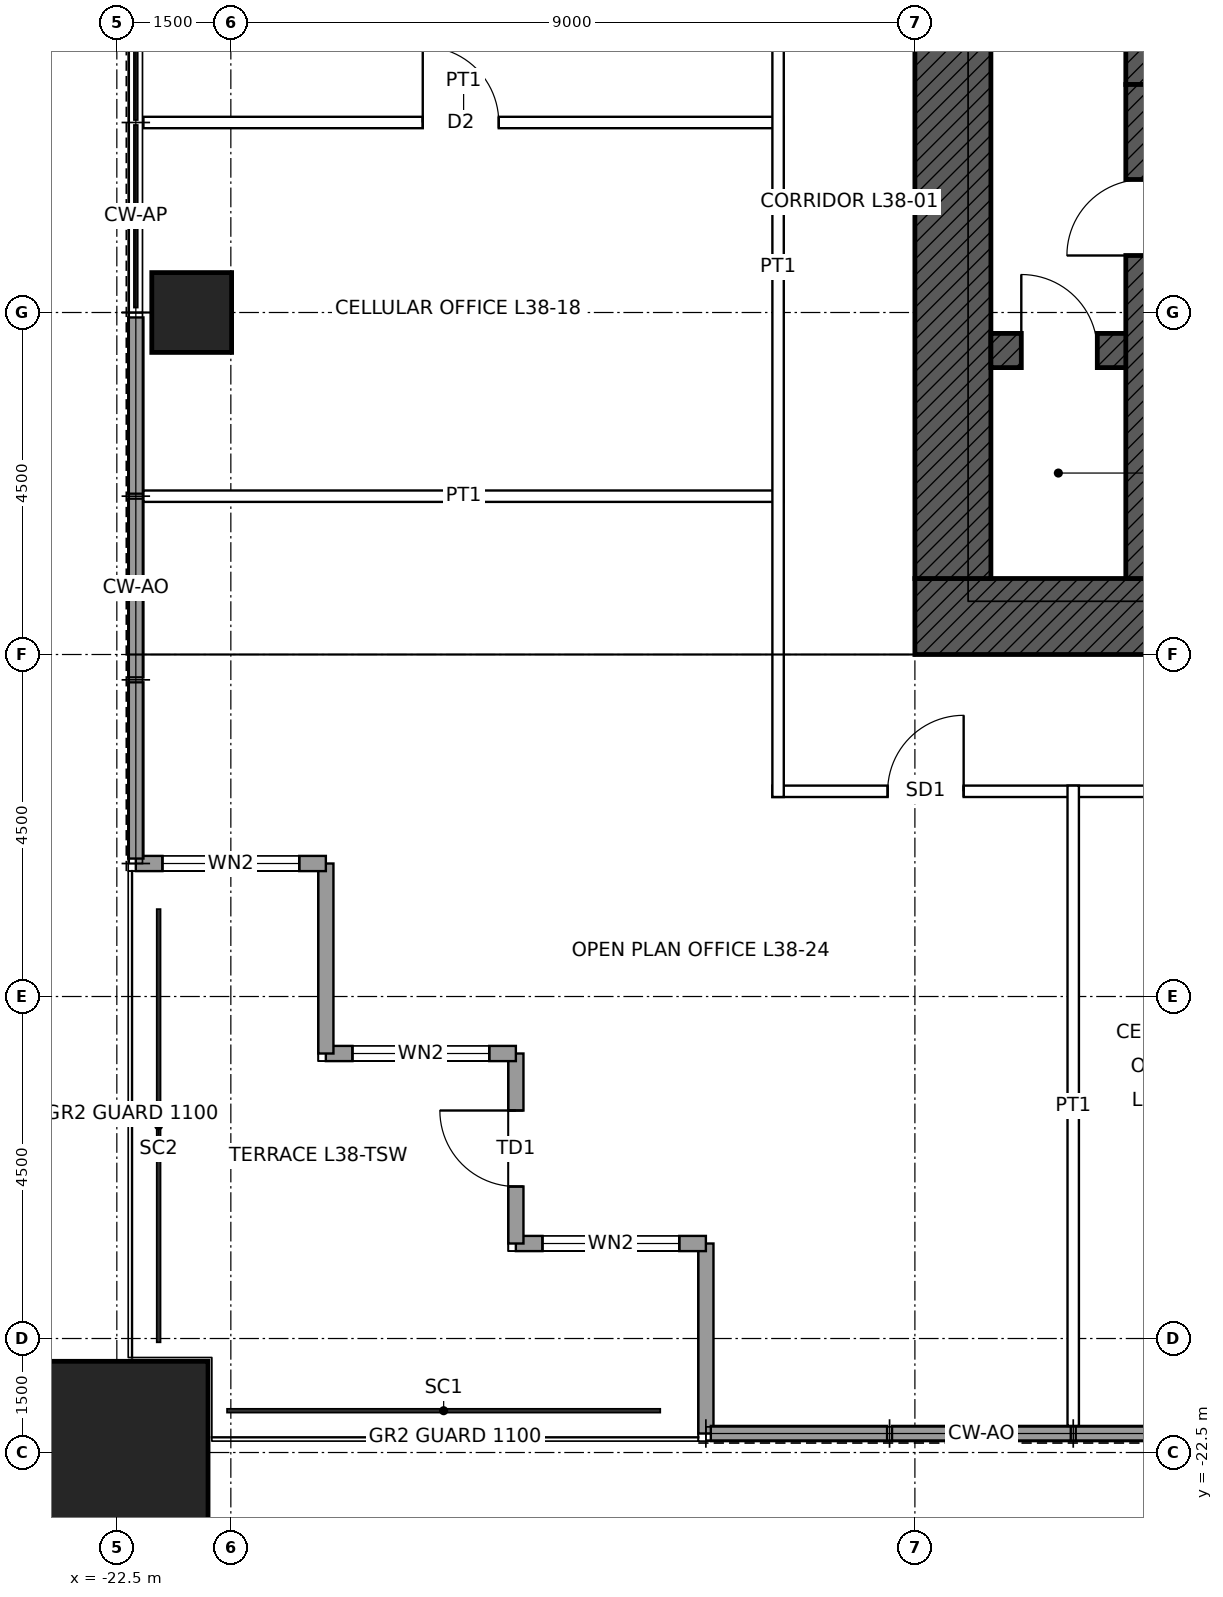
"""IFC4 building model, lengths in metres.
Left out: names, types, materials, properties, quantities, classifications, styles, units other than length and angle.
Written with IfcOpenShell. Run it as: python <this file> out.ifc"""

import sys

from ifc_helpers import new_model, si_unit, direction, frame, frame_2d, origin, origin_2d, place, context, subcontext, project, spatial, rectangle, hollow_rectangle, extrude, element, fill, save


model = new_model("IFC4")
c1 = context("Model", 3, precision=1e-05, world=origin(), true_north=direction((0.0, 1.0)))
c2 = subcontext(c1, "Body", "Model", "MODEL_VIEW")
j1 = project(units=[si_unit("LENGTHUNIT", "METRE"), si_unit("PLANEANGLEUNIT", "RADIAN")], contexts=[c1])
p1 = place(None, origin())
s1 = spatial("IfcSite", under=j1, at=p1, CompositionType="ELEMENT")
p2 = place(p1, origin())
s2 = spatial("IfcBuilding", under=s1, at=p2, CompositionType="ELEMENT")
p3 = place(p2, frame((0.0, 0.0, 185.9)))
s3 = spatial("IfcBuildingStorey", under=s2, at=p3, CompositionType="ELEMENT", Elevation=185.9)
p4 = place(p3, frame((-22.5, -22.5, 0.0), z_axis=(0.0, 0.0, 1.0), x_axis=(1.0, 0.0, 0.0)))
e1 = element("IfcColumn", 1, at=p4, inside=s3, PredefinedType="COLUMN", context=c2, shape_type="SweptSolid", body=[
    extrude(hollow_rectangle(XDim=2.4, YDim=2.4, WallThickness=0.12, at=origin_2d()), origin(), (0.0, 0.0, 1.0), 4.0),
])
p5 = place(p3, frame((-21.515, -7.5, 0.0), z_axis=(0.0, 0.0, 1.0), x_axis=(1.0, 0.0, 0.0)))
e2 = element("IfcColumn", 2, at=p5, inside=s3, PredefinedType="COLUMN", context=c2, shape_type="SweptSolid", body=[
    extrude(hollow_rectangle(XDim=1.05, YDim=1.05, WallThickness=0.07, at=origin_2d()), origin(), (0.0, 0.0, 1.0), 4.0),
])
p6 = place(p3, frame((12.0, -11.5, 0.0), z_axis=(0.0, 0.0, 1.0), x_axis=(-1.0, 0.0, 0.0)))
e3 = element("IfcWall", 3, at=p6, inside=s3, PredefinedType="SHEAR", context=c2, shape_type="SweptSolid", body=[
    extrude(rectangle(XDim=24.0, YDim=1.0, at=frame_2d((12.0, 0.0))), origin(), (0.0, 0.0, 1.0), 4.0),
])
p7 = place(p6, frame((11.5, 0.0, 0.0)))
e4 = element("IfcOpeningElement", 4, at=p7, cuts=e3, PredefinedType="OPENING", context=c2, shape_type="SweptSolid", body=[
    extrude(rectangle(XDim=1.0, YDim=2.1, at=frame_2d((0.5, 1.05))), frame((0.0, 0.51, 0.0), z_axis=(0.0, -1.0, 0.0), x_axis=(1.0, 0.0, 0.0)), (0.0, 0.0, 1.0), 1.02),
])
p8 = place(p6, frame((1.0, 0.0, 0.0)))
e5 = element("IfcOpeningElement", 5, at=p8, cuts=e3, PredefinedType="OPENING", context=c2, shape_type="SweptSolid", body=[
    extrude(rectangle(XDim=1.0, YDim=2.4, at=frame_2d((0.5, 1.2))), frame((0.0, 0.51, 0.0), z_axis=(0.0, -1.0, 0.0), x_axis=(1.0, 0.0, 0.0)), (0.0, 0.0, 1.0), 1.02),
])
p9 = place(p3, frame((-11.5, -11.0, 0.0), z_axis=(0.0, 0.0, 1.0), x_axis=(0.0, 1.0, 0.0)))
e6 = element("IfcWall", 6, at=p9, inside=s3, PredefinedType="SHEAR", context=c2, shape_type="SweptSolid", body=[
    extrude(rectangle(XDim=22.0, YDim=1.0, at=frame_2d((11.0, 0.0))), origin(), (0.0, 0.0, 1.0), 4.0),
])
p10 = place(p9, frame((10.5, 0.0, 0.0)))
e7 = element("IfcOpeningElement", 7, at=p10, cuts=e6, PredefinedType="OPENING", context=c2, shape_type="SweptSolid", body=[
    extrude(rectangle(XDim=1.0, YDim=2.4, at=frame_2d((0.5, 1.2))), frame((0.0, 0.51, 0.0), z_axis=(0.0, -1.0, 0.0), x_axis=(1.0, 0.0, 0.0)), (0.0, 0.0, 1.0), 1.02),
])
p11 = place(p3, frame((-9.0, -4.5, 0.0), z_axis=(0.0, 0.0, 1.0), x_axis=(1.0, 0.0, 0.0)))
e8 = element("IfcWall", 8, at=p11, inside=s3, PredefinedType="SHEAR", context=c2, shape_type="SweptSolid", body=[
    extrude(rectangle(XDim=18.0, YDim=0.45, at=frame_2d((9.0, 0.0))), origin(), (0.0, 0.0, 1.0), 4.0),
])
p12 = place(p3, frame((-11.0, -8.0, 0.0), z_axis=(0.0, 0.0, 1.0), x_axis=(1.0, 0.0, 0.0)))
e9 = element("IfcWall", 9, at=p12, inside=s3, PredefinedType="SHEAR", context=c2, shape_type="SweptSolid", body=[
    extrude(rectangle(XDim=2.0, YDim=0.45, at=frame_2d((1.0, 0.0))), origin(), (0.0, 0.0, 1.0), 4.0),
])
p13 = place(p12, frame((0.4, 0.0, 0.0)))
e10 = element("IfcOpeningElement", 10, at=p13, cuts=e9, PredefinedType="OPENING", context=c2, shape_type="SweptSolid", body=[
    extrude(rectangle(XDim=1.0, YDim=2.1, at=frame_2d((0.5, 1.05))), frame((0.0, 0.235, 0.0), z_axis=(0.0, -1.0, 0.0), x_axis=(1.0, 0.0, 0.0)), (0.0, 0.0, 1.0), 0.47),
])
p14 = place(p3, frame((-9.0, -4.5, 0.0), z_axis=(0.0, 0.0, 1.0), x_axis=(0.0, 1.0, 0.0)))
e11 = element("IfcWall", 11, at=p14, inside=s3, PredefinedType="SHEAR", context=c2, shape_type="SweptSolid", body=[
    extrude(rectangle(XDim=3.0, YDim=0.45, at=frame_2d((1.5, 0.0))), origin(), (0.0, 0.0, 1.0), 4.0),
])
p15 = place(p3, frame((-9.0, -11.0, 0.0), z_axis=(0.0, 0.0, 1.0), x_axis=(0.0, 1.0, 0.0)))
e12 = element("IfcWall", 12, at=p15, inside=s3, PredefinedType="SHEAR", context=c2, shape_type="SweptSolid", body=[
    extrude(rectangle(XDim=6.5, YDim=0.45, at=frame_2d((3.25, 0.0))), origin(), (0.0, 0.0, 1.0), 4.0),
])
p16 = place(p15, frame((4.25, 0.0, 0.0)))
e13 = element("IfcOpeningElement", 13, at=p16, cuts=e12, PredefinedType="OPENING", context=c2, shape_type="SweptSolid", body=[
    extrude(rectangle(XDim=1.0, YDim=2.1, at=frame_2d((0.5, 1.05))), frame((0.0, 0.235, 0.0), z_axis=(0.0, -1.0, 0.0), x_axis=(1.0, 0.0, 0.0)), (0.0, 0.0, 1.0), 0.47),
])
p17 = place(p3, frame((-14.75, -22.25, 0.0), z_axis=(0.0, 0.0, 1.0), x_axis=(0.0, 1.0, 0.0)))
e14 = element("IfcWall", 14, at=p17, inside=s3, PredefinedType="SOLIDWALL", context=c2, shape_type="SweptSolid", body=[
    extrude(rectangle(XDim=2.5, YDim=0.2, at=frame_2d((1.25, 0.0))), origin(), (0.0, 0.0, 1.0), 3.85),
])
p18 = place(p3, frame((-14.75, -19.75, 0.0), z_axis=(0.0, 0.0, 1.0), x_axis=(-1.0, 0.0, 0.0)))
e15 = element("IfcWall", 15, at=p18, inside=s3, PredefinedType="SOLIDWALL", context=c2, shape_type="SweptSolid", body=[
    extrude(rectangle(XDim=2.5, YDim=0.2, at=frame_2d((1.25, 0.0))), origin(), (0.0, 0.0, 1.0), 3.85),
])
p19 = place(p18, frame((0.35, 0.0, 0.3)))
e16 = element("IfcOpeningElement", 16, at=p19, cuts=e15, PredefinedType="OPENING", context=c2, shape_type="SweptSolid", body=[
    extrude(rectangle(XDim=1.8, YDim=2.4, at=frame_2d((0.9, 1.2))), frame((0.0, 0.11, 0.0), z_axis=(0.0, -1.0, 0.0), x_axis=(1.0, 0.0, 0.0)), (0.0, 0.0, 1.0), 0.22),
])
p20 = place(p3, frame((-17.25, -19.75, 0.0), z_axis=(0.0, 0.0, 1.0), x_axis=(0.0, 1.0, 0.0)))
e17 = element("IfcWall", 17, at=p20, inside=s3, PredefinedType="SOLIDWALL", context=c2, shape_type="SweptSolid", body=[
    extrude(rectangle(XDim=2.5, YDim=0.2, at=frame_2d((1.25, 0.0))), origin(), (0.0, 0.0, 1.0), 3.85),
])
p21 = place(p20, frame((0.75, 0.0, 0.0)))
e18 = element("IfcOpeningElement", 18, at=p21, cuts=e17, PredefinedType="OPENING", context=c2, shape_type="SweptSolid", body=[
    extrude(rectangle(XDim=1.0, YDim=2.4, at=frame_2d((0.5, 1.2))), frame((0.0, 0.11, 0.0), z_axis=(0.0, -1.0, 0.0), x_axis=(1.0, 0.0, 0.0)), (0.0, 0.0, 1.0), 0.22),
])
p22 = place(p3, frame((-17.25, -17.25, 0.0), z_axis=(0.0, 0.0, 1.0), x_axis=(-1.0, 0.0, 0.0)))
e19 = element("IfcWall", 19, at=p22, inside=s3, PredefinedType="SOLIDWALL", context=c2, shape_type="SweptSolid", body=[
    extrude(rectangle(XDim=2.5, YDim=0.2, at=frame_2d((1.25, 0.0))), origin(), (0.0, 0.0, 1.0), 3.85),
])
p23 = place(p22, frame((0.35, 0.0, 0.3)))
e20 = element("IfcOpeningElement", 20, at=p23, cuts=e19, PredefinedType="OPENING", context=c2, shape_type="SweptSolid", body=[
    extrude(rectangle(XDim=1.8, YDim=2.4, at=frame_2d((0.9, 1.2))), frame((0.0, 0.11, 0.0), z_axis=(0.0, -1.0, 0.0), x_axis=(1.0, 0.0, 0.0)), (0.0, 0.0, 1.0), 0.22),
])
p24 = place(p3, frame((-19.75, -17.25, 0.0), z_axis=(0.0, 0.0, 1.0), x_axis=(0.0, 1.0, 0.0)))
e21 = element("IfcWall", 21, at=p24, inside=s3, PredefinedType="SOLIDWALL", context=c2, shape_type="SweptSolid", body=[
    extrude(rectangle(XDim=2.5, YDim=0.2, at=frame_2d((1.25, 0.0))), origin(), (0.0, 0.0, 1.0), 3.85),
])
p25 = place(p3, frame((-19.75, -14.75, 0.0), z_axis=(0.0, 0.0, 1.0), x_axis=(-1.0, 0.0, 0.0)))
e22 = element("IfcWall", 22, at=p25, inside=s3, PredefinedType="SOLIDWALL", context=c2, shape_type="SweptSolid", body=[
    extrude(rectangle(XDim=2.5, YDim=0.2, at=frame_2d((1.25, 0.0))), origin(), (0.0, 0.0, 1.0), 3.85),
])
p26 = place(p25, frame((0.35, 0.0, 0.3)))
e23 = element("IfcOpeningElement", 23, at=p26, cuts=e22, PredefinedType="OPENING", context=c2, shape_type="SweptSolid", body=[
    extrude(rectangle(XDim=1.8, YDim=2.4, at=frame_2d((0.9, 1.2))), frame((0.0, 0.11, 0.0), z_axis=(0.0, -1.0, 0.0), x_axis=(1.0, 0.0, 0.0)), (0.0, 0.0, 1.0), 0.22),
])
p27 = place(p3, frame((-7.565, -22.25, 0.0), z_axis=(0.0, 0.0, 1.0), x_axis=(-1.0, 0.0, 0.0)))
e24 = element("IfcWall", 24, at=p27, inside=s3, PredefinedType="SOLIDWALL", context=c2, shape_type="SweptSolid", body=[
    extrude(rectangle(XDim=2.319, YDim=0.2, at=frame_2d((1.16, 0.0))), origin(), (0.0, 0.0, 1.0), 3.85),
])
p28 = place(p3, frame((-9.949, -22.25, 0.0), z_axis=(0.0, 0.0, 1.0), x_axis=(-1.0, 0.0, 0.0)))
e25 = element("IfcWall", 25, at=p28, inside=s3, PredefinedType="SOLIDWALL", context=c2, shape_type="SweptSolid", body=[
    extrude(rectangle(XDim=2.352, YDim=0.2, at=frame_2d((1.176, 0.0))), origin(), (0.0, 0.0, 1.0), 3.85),
])
for number, where, z_axis, x_axis in (
    (26, (-12.366, -22.25, 0.0), (0.0, 0.0, 1.0), (-1.0, 0.0, 0.0)),
    (27, (-22.25, -14.685, 0.0), (0.0, 0.0, 1.0), (0.0, 1.0, 0.0)),
):
    element("IfcWall", number, at=place(p3, frame(where, z_axis=z_axis, x_axis=x_axis)), inside=s3, PredefinedType="SOLIDWALL", context=c2, shape_type="SweptSolid", body=[
        extrude(rectangle(XDim=2.319, YDim=0.2, at=frame_2d((1.16, 0.0))), origin(), (0.0, 0.0, 1.0), 3.85),
    ])
p29 = place(p3, frame((-22.25, -12.301, 0.0), z_axis=(0.0, 0.0, 1.0), x_axis=(0.0, 1.0, 0.0)))
e28 = element("IfcWall", 28, at=p29, inside=s3, PredefinedType="SOLIDWALL", context=c2, shape_type="SweptSolid", body=[
    extrude(rectangle(XDim=2.352, YDim=0.2, at=frame_2d((1.176, 0.0))), origin(), (0.0, 0.0, 1.0), 3.85),
])
p30 = place(p3, frame((-22.25, -9.884, 0.0), z_axis=(0.0, 0.0, 1.0), x_axis=(0.0, 1.0, 0.0)))
e29 = element("IfcWall", 29, at=p30, inside=s3, PredefinedType="SOLIDWALL", context=c2, shape_type="SweptSolid", body=[
    extrude(rectangle(XDim=2.319, YDim=0.2, at=frame_2d((1.16, 0.0))), origin(), (0.0, 0.0, 1.0), 3.85),
])
p31 = place(p3, frame((-13.875, -13.8, 0.0), z_axis=(0.0, 0.0, 1.0), x_axis=(1.0, 0.0, 0.0)))
e30 = element("IfcWall", 30, at=p31, inside=s3, PredefinedType="PARTITIONING", context=c2, shape_type="SweptSolid", body=[
    extrude(rectangle(XDim=27.75, YDim=0.15, at=frame_2d((13.875, 0.0))), origin(), (0.0, 0.0, 1.0), 3.85),
])
p32 = place(p31, frame((18.375, 0.0, 0.0)))
e31 = element("IfcOpeningElement", 31, at=p32, cuts=e30, PredefinedType="OPENING", context=c2, shape_type="SweptSolid", body=[
    extrude(rectangle(XDim=1.0, YDim=2.4, at=frame_2d((0.5, 1.2))), frame((0.0, 0.085, 0.0), z_axis=(0.0, -1.0, 0.0), x_axis=(1.0, 0.0, 0.0)), (0.0, 0.0, 1.0), 0.17),
])
p33 = place(p31, frame((14.975, 0.0, 0.0)))
e32 = element("IfcOpeningElement", 32, at=p33, cuts=e30, PredefinedType="OPENING", context=c2, shape_type="SweptSolid", body=[
    extrude(rectangle(XDim=1.0, YDim=2.1, at=frame_2d((0.5, 1.05))), frame((0.0, 0.085, 0.0), z_axis=(0.0, -1.0, 0.0), x_axis=(1.0, 0.0, 0.0)), (0.0, 0.0, 1.0), 0.17),
])
p34 = place(p31, frame((11.775, 0.0, 0.0)))
e33 = element("IfcOpeningElement", 33, at=p34, cuts=e30, PredefinedType="OPENING", context=c2, shape_type="SweptSolid", body=[
    extrude(rectangle(XDim=1.0, YDim=2.1, at=frame_2d((0.5, 1.05))), frame((0.0, 0.085, 0.0), z_axis=(0.0, -1.0, 0.0), x_axis=(1.0, 0.0, 0.0)), (0.0, 0.0, 1.0), 0.17),
])
p35 = place(p31, frame((8.375, 0.0, 0.0)))
e34 = element("IfcOpeningElement", 34, at=p35, cuts=e30, PredefinedType="OPENING", context=c2, shape_type="SweptSolid", body=[
    extrude(rectangle(XDim=1.0, YDim=2.4, at=frame_2d((0.5, 1.2))), frame((0.0, 0.085, 0.0), z_axis=(0.0, -1.0, 0.0), x_axis=(1.0, 0.0, 0.0)), (0.0, 0.0, 1.0), 0.17),
])
p36 = place(p31, frame((25.65, 0.0, 0.0)))
e35 = element("IfcOpeningElement", 35, at=p36, cuts=e30, PredefinedType="OPENING", context=c2, shape_type="SweptSolid", body=[
    extrude(rectangle(XDim=1.0, YDim=2.4, at=frame_2d((0.5, 1.2))), frame((0.0, 0.085, 0.0), z_axis=(0.0, -1.0, 0.0), x_axis=(1.0, 0.0, 0.0)), (0.0, 0.0, 1.0), 0.17),
])
p37 = place(p31, frame((1.517, 0.0, 0.0)))
e36 = element("IfcOpeningElement", 36, at=p37, cuts=e30, PredefinedType="OPENING", context=c2, shape_type="SweptSolid", body=[
    extrude(rectangle(XDim=1.0, YDim=2.4, at=frame_2d((0.5, 1.2))), frame((0.0, 0.085, 0.0), z_axis=(0.0, -1.0, 0.0), x_axis=(1.0, 0.0, 0.0)), (0.0, 0.0, 1.0), 0.17),
])
p38 = place(p3, frame((-22.15, -9.917, 0.0), z_axis=(0.0, 0.0, 1.0), x_axis=(1.0, 0.0, 0.0)))
e37 = element("IfcWall", 37, at=p38, inside=s3, PredefinedType="PARTITIONING", context=c2, shape_type="SweptSolid", body=[
    extrude(rectangle(XDim=8.425, YDim=0.15, at=frame_2d((4.212, 0.0))), origin(), (0.0, 0.0, 1.0), 3.85),
])
p39 = place(p3, frame((-22.15, -5.0, 0.0), z_axis=(0.0, 0.0, 1.0), x_axis=(1.0, 0.0, 0.0)))
e38 = element("IfcWall", 38, at=p39, inside=s3, PredefinedType="PARTITIONING", context=c2, shape_type="SweptSolid", body=[
    extrude(rectangle(XDim=8.425, YDim=0.15, at=frame_2d((4.212, 0.0))), origin(), (0.0, 0.0, 1.0), 3.85),
])
p40 = place(p39, frame((3.675, 0.0, 0.0)))
e39 = element("IfcOpeningElement", 39, at=p40, cuts=e38, PredefinedType="OPENING", context=c2, shape_type="SweptSolid", body=[
    extrude(rectangle(XDim=1.0, YDim=2.1, at=frame_2d((0.5, 1.05))), frame((0.0, 0.085, 0.0), z_axis=(0.0, -1.0, 0.0), x_axis=(1.0, 0.0, 0.0)), (0.0, 0.0, 1.0), 0.17),
])
p41 = place(p3, frame((-13.8, -13.875, 0.0), z_axis=(0.0, 0.0, 1.0), x_axis=(0.0, 1.0, 0.0)))
e40 = element("IfcWall", 40, at=p41, inside=s3, PredefinedType="PARTITIONING", context=c2, shape_type="SweptSolid", body=[
    extrude(rectangle(XDim=13.95, YDim=0.15, at=frame_2d((6.975, 0.0))), origin(), (0.0, 0.0, 1.0), 3.85),
])
p42 = place(p41, frame((10.875, 0.0, 0.0)))
e41 = element("IfcOpeningElement", 41, at=p42, cuts=e40, PredefinedType="OPENING", context=c2, shape_type="SweptSolid", body=[
    extrude(rectangle(XDim=1.0, YDim=2.4, at=frame_2d((0.5, 1.2))), frame((0.0, 0.085, 0.0), z_axis=(0.0, -1.0, 0.0), x_axis=(1.0, 0.0, 0.0)), (0.0, 0.0, 1.0), 0.17),
])
p43 = place(p3, frame((-9.917, -22.15, 0.0), z_axis=(0.0, 0.0, 1.0), x_axis=(0.0, 1.0, 0.0)))
e42 = element("IfcWall", 42, at=p43, inside=s3, PredefinedType="PARTITIONING", context=c2, shape_type="SweptSolid", body=[
    extrude(rectangle(XDim=8.425, YDim=0.15, at=frame_2d((4.212, 0.0))), origin(), (0.0, 0.0, 1.0), 3.85),
])
p44 = place(p19, origin())
e43 = element("IfcWindow", 43, at=p44, inside=s3, PartitioningType="SINGLE_PANEL", PredefinedType="WINDOW", context=c2, shape_type="SweptSolid", body=[
    extrude(rectangle(XDim=1.8, YDim=2.4, at=frame_2d((0.9, 1.2))), frame((0.0, 0.03, 0.0), z_axis=(0.0, -1.0, 0.0), x_axis=(1.0, 0.0, 0.0)), (0.0, 0.0, 1.0), 0.06),
])
fill(e16, e43)
p45 = place(p21, origin())
e44 = element("IfcDoor", 44, at=p45, inside=s3, OperationType="SINGLE_SWING_RIGHT", PredefinedType="DOOR", context=c2, shape_type="SweptSolid", body=[
    extrude(rectangle(XDim=1.0, YDim=2.4, at=frame_2d((0.5, 1.2))), frame((0.0, 0.025, 0.0), z_axis=(0.0, -1.0, 0.0), x_axis=(1.0, 0.0, 0.0)), (0.0, 0.0, 1.0), 0.05),
])
fill(e18, e44)
p46 = place(p23, origin())
e45 = element("IfcWindow", 45, at=p46, inside=s3, PartitioningType="SINGLE_PANEL", PredefinedType="WINDOW", context=c2, shape_type="SweptSolid", body=[
    extrude(rectangle(XDim=1.8, YDim=2.4, at=frame_2d((0.9, 1.2))), frame((0.0, 0.03, 0.0), z_axis=(0.0, -1.0, 0.0), x_axis=(1.0, 0.0, 0.0)), (0.0, 0.0, 1.0), 0.06),
])
fill(e20, e45)
p47 = place(p26, origin())
e46 = element("IfcWindow", 46, at=p47, inside=s3, PartitioningType="SINGLE_PANEL", PredefinedType="WINDOW", context=c2, shape_type="SweptSolid", body=[
    extrude(rectangle(XDim=1.8, YDim=2.4, at=frame_2d((0.9, 1.2))), frame((0.0, 0.03, 0.0), z_axis=(0.0, -1.0, 0.0), x_axis=(1.0, 0.0, 0.0)), (0.0, 0.0, 1.0), 0.06),
])
fill(e23, e46)
p48 = place(p16, origin())
e47 = element("IfcDoor", 47, at=p48, inside=s3, OperationType="SINGLE_SWING_LEFT", PredefinedType="DOOR", context=c2, shape_type="SweptSolid", body=[
    extrude(rectangle(XDim=1.0, YDim=2.1, at=frame_2d((0.5, 1.05))), frame((0.0, 0.025, 0.0), z_axis=(0.0, -1.0, 0.0), x_axis=(1.0, 0.0, 0.0)), (0.0, 0.0, 1.0), 0.05),
])
fill(e13, e47)
p49 = place(p13, origin())
e48 = element("IfcDoor", 48, at=p49, inside=s3, OperationType="SINGLE_SWING_LEFT", PredefinedType="DOOR", context=c2, shape_type="SweptSolid", body=[
    extrude(rectangle(XDim=1.0, YDim=2.1, at=frame_2d((0.5, 1.05))), frame((0.0, 0.025, 0.0), z_axis=(0.0, -1.0, 0.0), x_axis=(1.0, 0.0, 0.0)), (0.0, 0.0, 1.0), 0.05),
])
fill(e10, e48)
p50 = place(p40, origin())
e49 = element("IfcDoor", 49, at=p50, inside=s3, OperationType="SINGLE_SWING_LEFT", PredefinedType="DOOR", context=c2, shape_type="SweptSolid", body=[
    extrude(rectangle(XDim=1.0, YDim=2.1, at=frame_2d((0.5, 1.05))), frame((0.0, 0.025, 0.0), z_axis=(0.0, -1.0, 0.0), x_axis=(1.0, 0.0, 0.0)), (0.0, 0.0, 1.0), 0.05),
])
fill(e39, e49)
p51 = place(p37, origin())
e50 = element("IfcDoor", 50, at=p51, inside=s3, OperationType="SINGLE_SWING_RIGHT", PredefinedType="DOOR", context=c2, shape_type="SweptSolid", body=[
    extrude(rectangle(XDim=1.0, YDim=2.4, at=frame_2d((0.5, 1.2))), frame((0.0, 0.025, 0.0), z_axis=(0.0, -1.0, 0.0), x_axis=(1.0, 0.0, 0.0)), (0.0, 0.0, 1.0), 0.05),
])
fill(e36, e50)
save(model, sys.argv[1])
